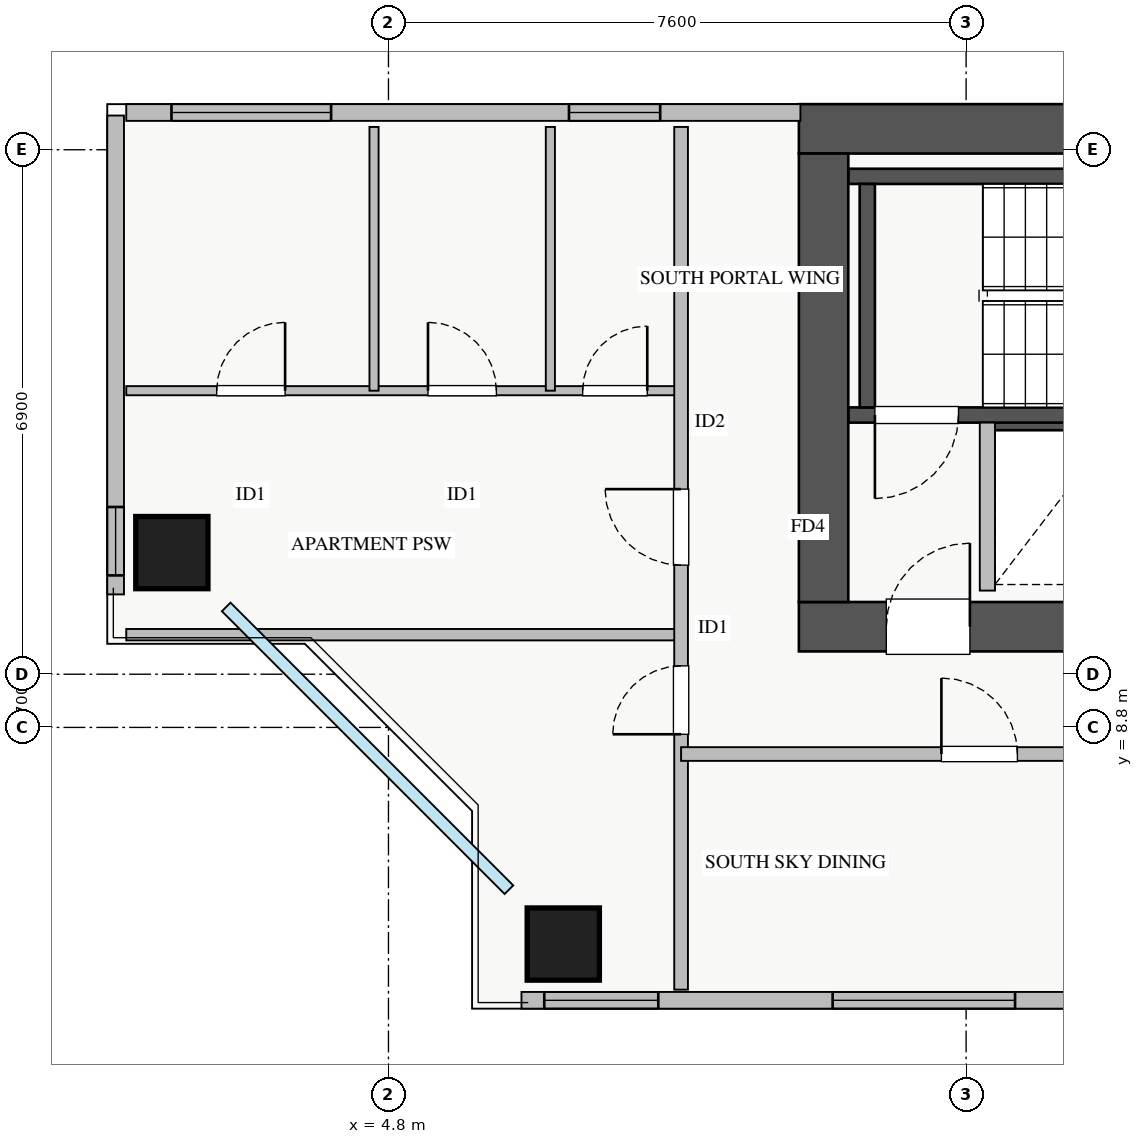
"""IFC4 building model, lengths in metres.
Left out: names, types, materials, properties, quantities, classifications, styles, units other than length and angle.
Written with IfcOpenShell. Run it as: python <this file> out.ifc"""

import sys

from ifc_helpers import new_model, si_unit, direction, frame, frame_2d, origin, origin_2d, place, context, subcontext, project, spatial, rectangle, extrude, source, transform, mapped, element, fill, save


model = new_model("IFC4")
c1 = context("Model", 3, precision=1e-05, world=origin(), true_north=direction((0.0, 1.0)))
c2 = subcontext(c1, "Body", "Model", "MODEL_VIEW")
j1 = project(units=[si_unit("LENGTHUNIT", "METRE"), si_unit("PLANEANGLEUNIT", "RADIAN")], contexts=[c1])
p1 = place(None, origin())
s1 = spatial("IfcSite", under=j1, at=p1, CompositionType="ELEMENT")
p2 = place(p1, origin())
s2 = spatial("IfcBuilding", under=s1, at=p2, CompositionType="ELEMENT")
p3 = place(p2, frame((0.0, 0.0, 156.75)))
s3 = spatial("IfcBuildingStorey", under=s2, at=p3, CompositionType="ELEMENT", Elevation=156.75)
p4 = place(p3, frame((12.68, 12.8, 0.0), z_axis=(0.0, 0.0, 1.0), x_axis=(1.0, 0.0, 0.0)))
e1 = element("IfcWall", 1, at=p4, inside=s3, PredefinedType="SHEAR", context=c2, shape_type="SweptSolid", body=[
    extrude(rectangle(XDim=1.94, YDim=0.18, at=frame_2d((0.97, 0.0))), origin(), (0.0, 0.0, 1.0), 3.07),
])
p5 = place(p3, frame((10.85, 12.91, 0.0), z_axis=(0.0, 0.0, 1.0), x_axis=(1.0, 0.0, 0.0)))
e2 = element("IfcWall", 2, at=p5, inside=s3, PredefinedType="SHEAR", context=c2, shape_type="SweptSolid", body=[
    extrude(rectangle(XDim=7.3, YDim=0.2, at=frame_2d((3.65, 0.0))), origin(), (0.0, 0.0, 1.0), 3.25),
])
p6 = place(p5, frame((0.35, 0.0, 0.0)))
e3 = element("IfcOpeningElement", 3, at=p6, cuts=e2, PredefinedType="OPENING", context=c2, shape_type="SweptSolid", body=[
    extrude(rectangle(XDim=1.1, YDim=2.05, at=frame_2d((0.55, 1.025))), frame((0.0, 0.11, 0.0), z_axis=(0.0, -1.0, 0.0), x_axis=(1.0, 0.0, 0.0)), (0.0, 0.0, 1.0), 0.22),
])
p7 = place(p3, frame((10.85, 16.05, 0.0), z_axis=(0.0, 0.0, 1.0), x_axis=(1.0, 0.0, 0.0)))
e4 = element("IfcWall", 4, at=p7, inside=s3, PredefinedType="SHEAR", context=c2, shape_type="SweptSolid", body=[
    extrude(rectangle(XDim=7.3, YDim=0.2, at=frame_2d((3.65, 0.0))), origin(), (0.0, 0.0, 1.0), 3.25),
])
p8 = place(p3, frame((11.1, 13.01, 0.0), z_axis=(0.0, 0.0, 1.0), x_axis=(0.0, 1.0, 0.0)))
e5 = element("IfcWall", 5, at=p8, inside=s3, PredefinedType="SHEAR", context=c2, shape_type="SweptSolid", body=[
    extrude(rectangle(XDim=2.94, YDim=0.2, at=frame_2d((1.47, 0.0))), origin(), (0.0, 0.0, 1.0), 3.25),
])
p9 = place(p3, frame((10.2, 10.125, 0.0), z_axis=(0.0, 0.0, 1.0), x_axis=(1.0, 0.0, 0.0)))
e6 = element("IfcWall", 6, at=p9, inside=s3, PredefinedType="SHEAR", context=c2, shape_type="SweptSolid", body=[
    extrude(rectangle(XDim=17.6, YDim=0.65, at=frame_2d((8.8, 0.0))), origin(), (0.0, 0.0, 1.0), 3.25),
])
p10 = place(p9, frame((1.15, 0.0, 0.0)))
e7 = element("IfcOpeningElement", 7, at=p10, cuts=e6, PredefinedType="OPENING", context=c2, shape_type="SweptSolid", body=[
    extrude(rectangle(XDim=1.1, YDim=2.05, at=frame_2d((0.55, 1.025))), frame((0.0, 0.335, 0.0), z_axis=(0.0, -1.0, 0.0), x_axis=(1.0, 0.0, 0.0)), (0.0, 0.0, 1.0), 0.67),
])
p11 = place(p9, frame((8.3, 0.0, 0.0)))
e8 = element("IfcOpeningElement", 8, at=p11, cuts=e6, PredefinedType="OPENING", context=c2, shape_type="SweptSolid", body=[
    extrude(rectangle(XDim=1.1, YDim=2.05, at=frame_2d((0.55, 1.025))), frame((0.0, 0.335, 0.0), z_axis=(0.0, -1.0, 0.0), x_axis=(1.0, 0.0, 0.0)), (0.0, 0.0, 1.0), 0.67),
])
p12 = place(p9, frame((4.9, 0.0, 0.0)))
e9 = element("IfcOpeningElement", 9, at=p12, cuts=e6, PredefinedType="OPENING", context=c2, shape_type="SweptSolid", body=[
    extrude(rectangle(XDim=1.1, YDim=2.05, at=frame_2d((0.55, 1.025))), frame((0.0, 0.335, 0.0), z_axis=(0.0, -1.0, 0.0), x_axis=(1.0, 0.0, 0.0)), (0.0, 0.0, 1.0), 0.67),
])
p13 = place(p9, frame((14.74, 0.0, 0.0)))
e10 = element("IfcOpeningElement", 10, at=p13, cuts=e6, PredefinedType="OPENING", context=c2, shape_type="SweptSolid", body=[
    extrude(rectangle(XDim=1.0, YDim=2.05, at=frame_2d((0.5, 1.025))), frame((0.0, 0.335, 0.0), z_axis=(0.0, -1.0, 0.0), x_axis=(1.0, 0.0, 0.0)), (0.0, 0.0, 1.0), 0.67),
])
p14 = place(p9, frame((11.67, 0.0, 0.0)))
e11 = element("IfcOpeningElement", 11, at=p14, cuts=e6, PredefinedType="OPENING", context=c2, shape_type="SweptSolid", body=[
    extrude(rectangle(XDim=1.0, YDim=2.05, at=frame_2d((0.5, 1.025))), frame((0.0, 0.335, 0.0), z_axis=(0.0, -1.0, 0.0), x_axis=(1.0, 0.0, 0.0)), (0.0, 0.0, 1.0), 0.67),
])
p15 = place(p3, frame((10.2, 16.675, 0.0), z_axis=(0.0, 0.0, 1.0), x_axis=(1.0, 0.0, 0.0)))
e12 = element("IfcWall", 12, at=p15, inside=s3, PredefinedType="SHEAR", context=c2, shape_type="SweptSolid", body=[
    extrude(rectangle(XDim=17.6, YDim=0.65, at=frame_2d((8.8, 0.0))), origin(), (0.0, 0.0, 1.0), 3.25),
])
p16 = place(p3, frame((10.525, 10.45, 0.0), z_axis=(0.0, 0.0, 1.0), x_axis=(0.0, 1.0, 0.0)))
e13 = element("IfcWall", 13, at=p16, inside=s3, PredefinedType="SHEAR", context=c2, shape_type="SweptSolid", body=[
    extrude(rectangle(XDim=5.9, YDim=0.65, at=frame_2d((2.95, 0.0))), origin(), (0.0, 0.0, 1.0), 3.25),
])
m1 = source(origin(), c2, "Body", "SweptSolid", [
    extrude(rectangle(XDim=0.95, YDim=0.95, at=origin_2d()), origin(), (0.0, 0.0, 1.0), 3.25),
])
for number, where, z_axis, x_axis in (
    (14, (7.1, 5.95, 0.0), (0.0, 0.0, 1.0), (1.0, 0.0, 0.0)),
    (15, (1.95, 11.1, 0.0), (0.0, 0.0, 1.0), (1.0, 0.0, 0.0)),
):
    element("IfcColumn", number, at=place(p3, frame(where, z_axis=z_axis, x_axis=x_axis)), inside=s3, PredefinedType="COLUMN", context=c2, shape_type="MappedRepresentation", body=[
        mapped(m1, transform((0.0, 0.0, 0.0), x_axis=(1.0, 0.0, 0.0), y_axis=(0.0, 1.0, 0.0), z_axis=(0.0, 0.0, 1.0), scale=1.0)),
    ])
p17 = place(p3, frame((1.35, 16.89, 0.0), z_axis=(0.0, 0.0, 1.0), x_axis=(1.0, 0.0, 0.0)))
e16 = element("IfcWall", 16, at=p17, inside=s3, PredefinedType="STANDARD", context=c2, shape_type="SweptSolid", body=[
    extrude(rectangle(XDim=8.87, YDim=0.22, at=frame_2d((4.435, 0.0))), origin(), (0.0, 0.0, 1.0), 2.61),
])
p18 = place(p17, frame((0.595, 0.0, 0.9)))
e17 = element("IfcOpeningElement", 17, at=p18, cuts=e16, PredefinedType="OPENING", context=c2, shape_type="SweptSolid", body=[
    extrude(rectangle(XDim=2.1, YDim=1.5, at=frame_2d((1.05, 0.75))), frame((0.0, 0.12, 0.0), z_axis=(0.0, -1.0, 0.0), x_axis=(1.0, 0.0, 0.0)), (0.0, 0.0, 1.0), 0.24),
])
p19 = place(p17, frame((5.825, 0.0, 0.9)))
e18 = element("IfcOpeningElement", 18, at=p19, cuts=e16, PredefinedType="OPENING", context=c2, shape_type="SweptSolid", body=[
    extrude(rectangle(XDim=1.2, YDim=1.4, at=frame_2d((0.6, 0.7))), frame((0.0, 0.12, 0.0), z_axis=(0.0, -1.0, 0.0), x_axis=(1.0, 0.0, 0.0)), (0.0, 0.0, 1.0), 0.24),
])
p20 = place(p3, frame((1.21, 10.55, 0.0), z_axis=(0.0, 0.0, 1.0), x_axis=(0.0, 1.0, 0.0)))
e19 = element("IfcWall", 19, at=p20, inside=s3, PredefinedType="STANDARD", context=c2, shape_type="SweptSolid", body=[
    extrude(rectangle(XDim=6.3, YDim=0.22, at=frame_2d((3.15, 0.0))), origin(), (0.0, 0.0, 1.0), 2.61),
])
p21 = place(p20, frame((0.25, 0.0, 0.9)))
e20 = element("IfcOpeningElement", 20, at=p21, cuts=e19, PredefinedType="OPENING", context=c2, shape_type="SweptSolid", body=[
    extrude(rectangle(XDim=0.9, YDim=1.2, at=frame_2d((0.45, 0.6))), frame((0.0, 0.12, 0.0), z_axis=(0.0, -1.0, 0.0), x_axis=(1.0, 0.0, 0.0)), (0.0, 0.0, 1.0), 0.24),
])
p22 = place(p3, frame((6.55, 5.21, 0.0), z_axis=(0.0, 0.0, 1.0), x_axis=(1.0, 0.0, 0.0)))
e21 = element("IfcWall", 21, at=p22, inside=s3, PredefinedType="STANDARD", context=c2, shape_type="SweptSolid", body=[
    extrude(rectangle(XDim=24.9, YDim=0.22, at=frame_2d((12.45, 0.0))), origin(), (0.0, 0.0, 1.0), 2.61),
])
p23 = place(p22, frame((0.3, 0.0, 0.9)))
e22 = element("IfcOpeningElement", 22, at=p23, cuts=e21, PredefinedType="OPENING", context=c2, shape_type="SweptSolid", body=[
    extrude(rectangle(XDim=1.5, YDim=1.5, at=frame_2d((0.75, 0.75))), frame((0.0, 0.12, 0.0), z_axis=(0.0, -1.0, 0.0), x_axis=(1.0, 0.0, 0.0)), (0.0, 0.0, 1.0), 0.24),
])
p24 = place(p22, frame((7.304, 0.0, 0.9)))
e23 = element("IfcOpeningElement", 23, at=p24, cuts=e21, PredefinedType="OPENING", context=c2, shape_type="SweptSolid", body=[
    extrude(rectangle(XDim=1.8, YDim=1.5, at=frame_2d((0.9, 0.75))), frame((0.0, 0.12, 0.0), z_axis=(0.0, -1.0, 0.0), x_axis=(1.0, 0.0, 0.0)), (0.0, 0.0, 1.0), 0.24),
])
p25 = place(p22, frame((14.813, 0.0, 0.9)))
e24 = element("IfcOpeningElement", 24, at=p25, cuts=e21, PredefinedType="OPENING", context=c2, shape_type="SweptSolid", body=[
    extrude(rectangle(XDim=1.5, YDim=1.45, at=frame_2d((0.75, 0.725))), frame((0.0, 0.12, 0.0), z_axis=(0.0, -1.0, 0.0), x_axis=(1.0, 0.0, 0.0)), (0.0, 0.0, 1.0), 0.24),
])
p26 = place(p22, frame((20.738, 0.0, 0.9)))
e25 = element("IfcOpeningElement", 25, at=p26, cuts=e21, PredefinedType="OPENING", context=c2, shape_type="SweptSolid", body=[
    extrude(rectangle(XDim=2.1, YDim=1.48, at=frame_2d((1.05, 0.74))), frame((0.0, 0.12, 0.0), z_axis=(0.0, -1.0, 0.0), x_axis=(1.0, 0.0, 0.0)), (0.0, 0.0, 1.0), 0.24),
])
p27 = place(p22, frame((4.094, 0.0, 0.9)))
e26 = element("IfcOpeningElement", 26, at=p27, cuts=e21, PredefinedType="OPENING", context=c2, shape_type="SweptSolid", body=[
    extrude(rectangle(XDim=2.4, YDim=1.5, at=frame_2d((1.2, 0.75))), frame((0.0, 0.12, 0.0), z_axis=(0.0, -1.0, 0.0), x_axis=(1.0, 0.0, 0.0)), (0.0, 0.0, 1.0), 0.24),
])
p28 = place(p3, frame((12.68, 10.6, 0.0), z_axis=(0.0, 0.0, 1.0), x_axis=(0.0, 1.0, 0.0)))
e27 = element("IfcWall", 27, at=p28, inside=s3, PredefinedType="PARTITIONING", context=c2, shape_type="SweptSolid", body=[
    extrude(rectangle(XDim=2.21, YDim=0.2, at=frame_2d((1.105, 0.0))), origin(), (0.0, 0.0, 1.0), 3.07),
])
p29 = place(p3, frame((1.35, 13.23, 0.0), z_axis=(0.0, 0.0, 1.0), x_axis=(1.0, 0.0, 0.0)))
e28 = element("IfcWall", 28, at=p29, inside=s3, PredefinedType="PLUMBINGWALL", context=c2, shape_type="SweptSolid", body=[
    extrude(rectangle(XDim=7.3, YDim=0.12, at=frame_2d((3.65, 0.0))), origin(), (0.0, 0.0, 1.0), 3.07),
])
p30 = place(p29, frame((1.19, 0.0, 0.0)))
e29 = element("IfcOpeningElement", 29, at=p30, cuts=e28, PredefinedType="OPENING", context=c2, shape_type="SweptSolid", body=[
    extrude(rectangle(XDim=0.9, YDim=2.05, at=frame_2d((0.45, 1.025))), frame((0.0, 0.07, 0.0), z_axis=(0.0, -1.0, 0.0), x_axis=(1.0, 0.0, 0.0)), (0.0, 0.0, 1.0), 0.14),
])
p31 = place(p29, frame((3.97, 0.0, 0.0)))
e30 = element("IfcOpeningElement", 30, at=p31, cuts=e28, PredefinedType="OPENING", context=c2, shape_type="SweptSolid", body=[
    extrude(rectangle(XDim=0.9, YDim=2.05, at=frame_2d((0.45, 1.025))), frame((0.0, 0.07, 0.0), z_axis=(0.0, -1.0, 0.0), x_axis=(1.0, 0.0, 0.0)), (0.0, 0.0, 1.0), 0.14),
])
p32 = place(p29, frame((6.005, 0.0, 0.0)))
e31 = element("IfcOpeningElement", 31, at=p32, cuts=e28, PredefinedType="OPENING", context=c2, shape_type="SweptSolid", body=[
    extrude(rectangle(XDim=0.85, YDim=2.05, at=frame_2d((0.425, 1.025))), frame((0.0, 0.07, 0.0), z_axis=(0.0, -1.0, 0.0), x_axis=(1.0, 0.0, 0.0)), (0.0, 0.0, 1.0), 0.14),
])
for number, where, z_axis, x_axis in (
    (32, (4.61, 13.23, 0.0), (0.0, 0.0, 1.0), (0.0, 1.0, 0.0)),
    (33, (6.93, 13.23, 0.0), (0.0, 0.0, 1.0), (0.0, 1.0, 0.0)),
):
    element("IfcWall", number, at=place(p3, frame(where, z_axis=z_axis, x_axis=x_axis)), inside=s3, PredefinedType="PLUMBINGWALL", context=c2, shape_type="SweptSolid", body=[
        extrude(rectangle(XDim=3.47, YDim=0.12, at=frame_2d((1.735, 0.0))), origin(), (0.0, 0.0, 1.0), 3.07),
    ])
p33 = place(p3, frame((1.35, 10.02, 0.0), z_axis=(0.0, 0.0, 1.0), x_axis=(1.0, 0.0, 0.0)))
e34 = element("IfcWall", 34, at=p33, inside=s3, PredefinedType="PARTITIONING", context=c2, shape_type="SweptSolid", body=[
    extrude(rectangle(XDim=7.3, YDim=0.15, at=frame_2d((3.65, 0.0))), origin(), (0.0, 0.0, 1.0), 3.07),
])
p34 = place(p3, frame((8.65, 5.35, 0.0), z_axis=(0.0, 0.0, 1.0), x_axis=(0.0, 1.0, 0.0)))
e35 = element("IfcWall", 35, at=p34, inside=s3, PredefinedType="PARTITIONING", context=c2, shape_type="SweptSolid", body=[
    extrude(rectangle(XDim=11.35, YDim=0.18, at=frame_2d((5.675, 0.0))), origin(), (0.0, 0.0, 1.0), 3.07),
])
p35 = place(p34, frame((3.36, 0.0, 0.0)))
e36 = element("IfcOpeningElement", 36, at=p35, cuts=e35, PredefinedType="OPENING", context=c2, shape_type="SweptSolid", body=[
    extrude(rectangle(XDim=0.9, YDim=2.05, at=frame_2d((0.45, 1.025))), frame((0.0, 0.1, 0.0), z_axis=(0.0, -1.0, 0.0), x_axis=(1.0, 0.0, 0.0)), (0.0, 0.0, 1.0), 0.2),
])
p36 = place(p34, frame((5.585, 0.0, 0.0)))
e37 = element("IfcOpeningElement", 37, at=p36, cuts=e35, PredefinedType="OPENING", context=c2, shape_type="SweptSolid", body=[
    extrude(rectangle(XDim=1.0, YDim=2.05, at=frame_2d((0.5, 1.025))), frame((0.0, 0.1, 0.0), z_axis=(0.0, -1.0, 0.0), x_axis=(1.0, 0.0, 0.0)), (0.0, 0.0, 1.0), 0.2),
])
p37 = place(p3, frame((8.65, 8.45, 0.0), z_axis=(0.0, 0.0, 1.0), x_axis=(1.0, 0.0, 0.0)))
e38 = element("IfcWall", 38, at=p37, inside=s3, PredefinedType="PARTITIONING", context=c2, shape_type="SweptSolid", body=[
    extrude(rectangle(XDim=23.8, YDim=0.18, at=frame_2d((11.9, 0.0))), origin(), (0.0, 0.0, 1.0), 3.07),
])
p38 = place(p37, frame((3.425, 0.0, 0.0)))
e39 = element("IfcOpeningElement", 39, at=p38, cuts=e38, PredefinedType="OPENING", context=c2, shape_type="SweptSolid", body=[
    extrude(rectangle(XDim=1.0, YDim=2.05, at=frame_2d((0.5, 1.025))), frame((0.0, 0.1, 0.0), z_axis=(0.0, -1.0, 0.0), x_axis=(1.0, 0.0, 0.0)), (0.0, 0.0, 1.0), 0.2),
])
p39 = place(p37, frame((11.6, 0.0, 0.0)))
e40 = element("IfcOpeningElement", 40, at=p39, cuts=e38, PredefinedType="OPENING", context=c2, shape_type="SweptSolid", body=[
    extrude(rectangle(XDim=1.0, YDim=2.05, at=frame_2d((0.5, 1.025))), frame((0.0, 0.1, 0.0), z_axis=(0.0, -1.0, 0.0), x_axis=(1.0, 0.0, 0.0)), (0.0, 0.0, 1.0), 0.2),
])
p40 = place(p37, frame((19.575, 0.0, 0.0)))
e41 = element("IfcOpeningElement", 41, at=p40, cuts=e38, PredefinedType="OPENING", context=c2, shape_type="SweptSolid", body=[
    extrude(rectangle(XDim=1.0, YDim=2.05, at=frame_2d((0.5, 1.025))), frame((0.0, 0.1, 0.0), z_axis=(0.0, -1.0, 0.0), x_axis=(1.0, 0.0, 0.0)), (0.0, 0.0, 1.0), 0.2),
])
m2 = source(origin(), c2, "Body", "SweptSolid", [
    extrude(rectangle(XDim=2.1, YDim=1.5, at=frame_2d((1.05, 0.75))), frame((0.0, 0.03, 0.0), z_axis=(0.0, -1.0, 0.0), x_axis=(1.0, 0.0, 0.0)), (0.0, 0.0, 1.0), 0.06),
])
p41 = place(p18, origin())
e42 = element("IfcWindow", 42, at=p41, inside=s3, PartitioningType="TRIPLE_PANEL_VERTICAL", PredefinedType="WINDOW", context=c2, shape_type="MappedRepresentation", body=[
    mapped(m2, transform((0.0, 0.0, 0.0), x_axis=(1.0, 0.0, 0.0), y_axis=(0.0, 1.0, 0.0), z_axis=(0.0, 0.0, 1.0), scale=1.0)),
])
fill(e17, e42)
m3 = source(origin(), c2, "Body", "SweptSolid", [
    extrude(rectangle(XDim=1.2, YDim=1.4, at=frame_2d((0.6, 0.7))), frame((0.0, 0.03, 0.0), z_axis=(0.0, -1.0, 0.0), x_axis=(1.0, 0.0, 0.0)), (0.0, 0.0, 1.0), 0.06),
])
p42 = place(p19, origin())
e43 = element("IfcWindow", 43, at=p42, inside=s3, PartitioningType="TRIPLE_PANEL_VERTICAL", PredefinedType="WINDOW", context=c2, shape_type="MappedRepresentation", body=[
    mapped(m3, transform((0.0, 0.0, 0.0), x_axis=(1.0, 0.0, 0.0), y_axis=(0.0, 1.0, 0.0), z_axis=(0.0, 0.0, 1.0), scale=1.0)),
])
fill(e18, e43)
m4 = source(origin(), c2, "Body", "SweptSolid", [
    extrude(rectangle(XDim=1.5, YDim=1.5, at=frame_2d((0.75, 0.75))), frame((0.0, 0.03, 0.0), z_axis=(0.0, -1.0, 0.0), x_axis=(1.0, 0.0, 0.0)), (0.0, 0.0, 1.0), 0.06),
])
p43 = place(p23, origin())
e44 = element("IfcWindow", 44, at=p43, inside=s3, PartitioningType="TRIPLE_PANEL_VERTICAL", PredefinedType="WINDOW", context=c2, shape_type="MappedRepresentation", body=[
    mapped(m4, transform((0.0, 0.0, 0.0), x_axis=(1.0, 0.0, 0.0), y_axis=(0.0, 1.0, 0.0), z_axis=(0.0, 0.0, 1.0), scale=1.0)),
])
fill(e22, e44)
m5 = source(origin(), c2, "Body", "SweptSolid", [
    extrude(rectangle(XDim=1.1, YDim=2.05, at=frame_2d((0.55, 1.025))), frame((0.0, 0.025, 0.0), z_axis=(0.0, -1.0, 0.0), x_axis=(1.0, 0.0, 0.0)), (0.0, 0.0, 1.0), 0.05),
])
p44 = place(p10, origin())
e45 = element("IfcDoor", 45, at=p44, inside=s3, OperationType="SINGLE_SWING_RIGHT", PredefinedType="DOOR", context=c2, shape_type="MappedRepresentation", body=[
    mapped(m5, transform((0.0, 0.0, 0.0), x_axis=(1.0, 0.0, 0.0), y_axis=(0.0, 1.0, 0.0), z_axis=(0.0, 0.0, 1.0), scale=1.0)),
])
fill(e7, e45)
p45 = place(p6, frame((1.1, 0.0, 0.0), z_axis=(0.0, 0.0, 1.0), x_axis=(-1.0, 0.0, 0.0)))
e46 = element("IfcDoor", 46, at=p45, inside=s3, OperationType="SINGLE_SWING_LEFT", PredefinedType="DOOR", context=c2, shape_type="MappedRepresentation", body=[
    mapped(m5, transform((0.0, 0.0, 0.0), x_axis=(1.0, 0.0, 0.0), y_axis=(0.0, 1.0, 0.0), z_axis=(0.0, 0.0, 1.0), scale=1.0)),
])
fill(e3, e46)
m6 = source(origin(), c2, "Body", "SweptSolid", [
    extrude(rectangle(XDim=0.9, YDim=2.05, at=frame_2d((0.45, 1.025))), frame((0.0, 0.025, 0.0), z_axis=(0.0, -1.0, 0.0), x_axis=(1.0, 0.0, 0.0)), (0.0, 0.0, 1.0), 0.05),
])
p46 = place(p30, origin())
e47 = element("IfcDoor", 47, at=p46, inside=s3, OperationType="SINGLE_SWING_RIGHT", PredefinedType="DOOR", context=c2, shape_type="MappedRepresentation", body=[
    mapped(m6, transform((0.0, 0.0, 0.0), x_axis=(1.0, 0.0, 0.0), y_axis=(0.0, 1.0, 0.0), z_axis=(0.0, 0.0, 1.0), scale=1.0)),
])
fill(e29, e47)
p47 = place(p31, origin())
e48 = element("IfcDoor", 48, at=p47, inside=s3, OperationType="SINGLE_SWING_LEFT", PredefinedType="DOOR", context=c2, shape_type="MappedRepresentation", body=[
    mapped(m6, transform((0.0, 0.0, 0.0), x_axis=(1.0, 0.0, 0.0), y_axis=(0.0, 1.0, 0.0), z_axis=(0.0, 0.0, 1.0), scale=1.0)),
])
fill(e30, e48)
m7 = source(origin(), c2, "Body", "SweptSolid", [
    extrude(rectangle(XDim=0.85, YDim=2.05, at=frame_2d((0.425, 1.025))), frame((0.0, 0.025, 0.0), z_axis=(0.0, -1.0, 0.0), x_axis=(1.0, 0.0, 0.0)), (0.0, 0.0, 1.0), 0.05),
])
p48 = place(p32, origin())
e49 = element("IfcDoor", 49, at=p48, inside=s3, OperationType="SINGLE_SWING_RIGHT", PredefinedType="DOOR", context=c2, shape_type="MappedRepresentation", body=[
    mapped(m7, transform((0.0, 0.0, 0.0), x_axis=(1.0, 0.0, 0.0), y_axis=(0.0, 1.0, 0.0), z_axis=(0.0, 0.0, 1.0), scale=1.0)),
])
fill(e31, e49)
p49 = place(p35, origin())
e50 = element("IfcDoor", 50, at=p49, inside=s3, OperationType="SINGLE_SWING_LEFT", PredefinedType="DOOR", context=c2, shape_type="MappedRepresentation", body=[
    mapped(m6, transform((0.0, 0.0, 0.0), x_axis=(1.0, 0.0, 0.0), y_axis=(0.0, 1.0, 0.0), z_axis=(0.0, 0.0, 1.0), scale=1.0)),
])
fill(e36, e50)
m8 = source(origin(), c2, "Body", "SweptSolid", [
    extrude(rectangle(XDim=1.0, YDim=2.05, at=frame_2d((0.5, 1.025))), frame((0.0, 0.025, 0.0), z_axis=(0.0, -1.0, 0.0), x_axis=(1.0, 0.0, 0.0)), (0.0, 0.0, 1.0), 0.05),
])
p50 = place(p36, origin())
e51 = element("IfcDoor", 51, at=p50, inside=s3, OperationType="SINGLE_SWING_RIGHT", PredefinedType="DOOR", context=c2, shape_type="MappedRepresentation", body=[
    mapped(m8, transform((0.0, 0.0, 0.0), x_axis=(1.0, 0.0, 0.0), y_axis=(0.0, 1.0, 0.0), z_axis=(0.0, 0.0, 1.0), scale=1.0)),
])
fill(e37, e51)
p51 = place(p38, origin())
e52 = element("IfcDoor", 52, at=p51, inside=s3, OperationType="SINGLE_SWING_LEFT", PredefinedType="DOOR", context=c2, shape_type="MappedRepresentation", body=[
    mapped(m8, transform((0.0, 0.0, 0.0), x_axis=(1.0, 0.0, 0.0), y_axis=(0.0, 1.0, 0.0), z_axis=(0.0, 0.0, 1.0), scale=1.0)),
])
fill(e39, e52)
m9 = source(origin(), c2, "Body", "SweptSolid", [
    extrude(rectangle(XDim=2.4, YDim=1.5, at=frame_2d((1.2, 0.75))), frame((0.0, 0.03, 0.0), z_axis=(0.0, -1.0, 0.0), x_axis=(1.0, 0.0, 0.0)), (0.0, 0.0, 1.0), 0.06),
])
p52 = place(p27, origin())
e53 = element("IfcWindow", 53, at=p52, inside=s3, PartitioningType="TRIPLE_PANEL_VERTICAL", PredefinedType="WINDOW", context=c2, shape_type="MappedRepresentation", body=[
    mapped(m9, transform((0.0, 0.0, 0.0), x_axis=(1.0, 0.0, 0.0), y_axis=(0.0, 1.0, 0.0), z_axis=(0.0, 0.0, 1.0), scale=1.0)),
])
fill(e26, e53)
m10 = source(origin(), c2, "Body", "SweptSolid", [
    extrude(rectangle(XDim=0.9, YDim=1.2, at=frame_2d((0.45, 0.6))), frame((0.0, 0.03, 0.0), z_axis=(0.0, -1.0, 0.0), x_axis=(1.0, 0.0, 0.0)), (0.0, 0.0, 1.0), 0.06),
])
p53 = place(p21, origin())
e54 = element("IfcWindow", 54, at=p53, inside=s3, PartitioningType="SINGLE_PANEL", PredefinedType="WINDOW", context=c2, shape_type="MappedRepresentation", body=[
    mapped(m10, transform((0.0, 0.0, 0.0), x_axis=(1.0, 0.0, 0.0), y_axis=(0.0, 1.0, 0.0), z_axis=(0.0, 0.0, 1.0), scale=1.0)),
])
fill(e20, e54)
save(model, sys.argv[1])
